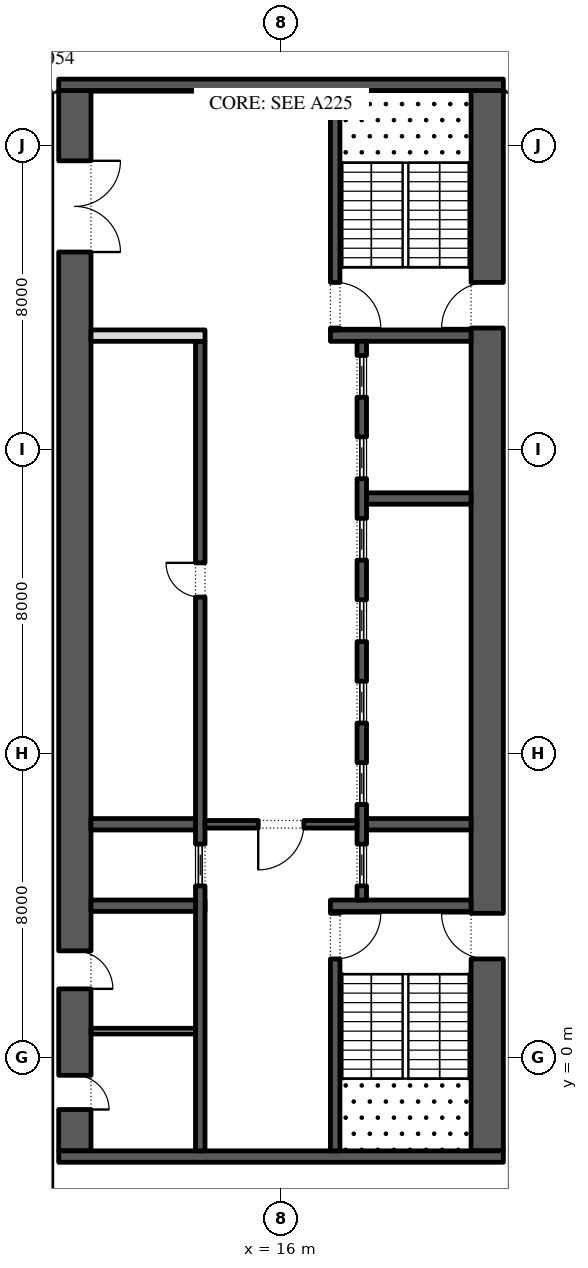
"""IFC4 building model, lengths in metres.
Left out: names, types, materials, properties, quantities, classifications, styles, units other than length and angle.
Written with IfcOpenShell. Run it as: python <this file> out.ifc"""

import sys

from ifc_helpers import new_model, si_unit, direction, frame, frame_2d, origin, place, context, subcontext, project, spatial, rectangle, extrude, element, fill, save


model = new_model("IFC4")
c1 = context("Model", 3, precision=1e-05, world=origin(), true_north=direction((0.0, 1.0)))
c2 = subcontext(c1, "Body", "Model", "MODEL_VIEW")
j1 = project(units=[si_unit("LENGTHUNIT", "METRE"), si_unit("PLANEANGLEUNIT", "RADIAN")], contexts=[c1])
p1 = place(None, origin())
s1 = spatial("IfcSite", under=j1, at=p1, CompositionType="ELEMENT")
p2 = place(p1, origin())
s2 = spatial("IfcBuilding", under=s1, at=p2, CompositionType="ELEMENT")
p3 = place(p2, frame((0.0, 0.0, 105.6)))
s3 = spatial("IfcBuildingStorey", under=s2, at=p3, CompositionType="ELEMENT", Elevation=105.6)
p4 = place(p3, frame((21.425, -2.45, 0.0), z_axis=(0.0, 0.0, 1.0), x_axis=(0.0, 1.0, 0.0)))
e1 = element("IfcWall", 1, at=p4, inside=s3, PredefinedType="SHEAR", context=c2, shape_type="SweptSolid", body=[
    extrude(rectangle(XDim=27.9, YDim=0.85, at=frame_2d((13.95, 0.0))), origin(), (0.0, 0.0, 1.0), 4.0),
])
p5 = place(p4, frame((5.05, 0.0, 0.0)))
e2 = element("IfcOpeningElement", 2, at=p5, cuts=e1, PredefinedType="OPENING", context=c2, shape_type="SweptSolid", body=[
    extrude(rectangle(XDim=1.2, YDim=2.1, at=frame_2d((0.6, 1.05))), frame((0.0, 0.435, 0.0), z_axis=(0.0, -1.0, 0.0), x_axis=(1.0, 0.0, 0.0)), (0.0, 0.0, 1.0), 0.87),
])
p6 = place(p4, frame((21.65, 0.0, 0.0)))
e3 = element("IfcOpeningElement", 3, at=p6, cuts=e1, PredefinedType="OPENING", context=c2, shape_type="SweptSolid", body=[
    extrude(rectangle(XDim=1.2, YDim=2.1, at=frame_2d((0.6, 1.05))), frame((0.0, 0.435, 0.0), z_axis=(0.0, -1.0, 0.0), x_axis=(1.0, 0.0, 0.0)), (0.0, 0.0, 1.0), 0.87),
])
p7 = place(p3, frame((10.575, -2.45, 0.0), z_axis=(0.0, 0.0, 1.0), x_axis=(0.0, 1.0, 0.0)))
e4 = element("IfcWall", 4, at=p7, inside=s3, PredefinedType="SHEAR", context=c2, shape_type="SweptSolid", body=[
    extrude(rectangle(XDim=27.9, YDim=0.85, at=frame_2d((13.95, 0.0))), origin(), (0.0, 0.0, 1.0), 4.0),
])
p8 = place(p7, frame((23.65, 0.0, 0.0)))
e5 = element("IfcOpeningElement", 5, at=p8, cuts=e4, PredefinedType="OPENING", context=c2, shape_type="SweptSolid", body=[
    extrude(rectangle(XDim=2.4, YDim=2.1, at=frame_2d((1.2, 1.05))), frame((0.0, 0.435, 0.0), z_axis=(0.0, -1.0, 0.0), x_axis=(1.0, 0.0, 0.0)), (0.0, 0.0, 1.0), 0.87),
])
p9 = place(p7, frame((1.087, 0.0, 0.0)))
e6 = element("IfcOpeningElement", 6, at=p9, cuts=e4, PredefinedType="OPENING", context=c2, shape_type="SweptSolid", body=[
    extrude(rectangle(XDim=0.9, YDim=2.1, at=frame_2d((0.45, 1.05))), frame((0.0, 0.435, 0.0), z_axis=(0.0, -1.0, 0.0), x_axis=(1.0, 0.0, 0.0)), (0.0, 0.0, 1.0), 0.87),
])
p10 = place(p7, frame((4.262, 0.0, 0.0)))
e7 = element("IfcOpeningElement", 7, at=p10, cuts=e4, PredefinedType="OPENING", context=c2, shape_type="SweptSolid", body=[
    extrude(rectangle(XDim=1.0, YDim=2.1, at=frame_2d((0.5, 1.05))), frame((0.0, 0.435, 0.0), z_axis=(0.0, -1.0, 0.0), x_axis=(1.0, 0.0, 0.0)), (0.0, 0.0, 1.0), 0.87),
])
for number, where, z_axis, x_axis in (
    (8, (10.15, -2.6, 0.0), (0.0, 0.0, 1.0), (1.0, 0.0, 0.0)),
    (9, (10.15, 25.6, 0.0), (0.0, 0.0, 1.0), (1.0, 0.0, 0.0)),
):
    element("IfcWall", number, at=place(p3, frame(where, z_axis=z_axis, x_axis=x_axis)), inside=s3, PredefinedType="SHEAR", context=c2, shape_type="SweptSolid", body=[
        extrude(rectangle(XDim=11.7, YDim=0.3, at=frame_2d((5.85, 0.0))), origin(), (0.0, 0.0, 1.0), 4.0),
    ])
p11 = place(p3, frame((17.3, 4.0, 0.0), z_axis=(0.0, 0.0, 1.0), x_axis=(1.0, 0.0, 0.0)))
e10 = element("IfcWall", 10, at=p11, inside=s3, PredefinedType="SHEAR", context=c2, shape_type="SweptSolid", body=[
    extrude(rectangle(XDim=3.7, YDim=0.3, at=frame_2d((1.85, 0.0))), origin(), (0.0, 0.0, 1.0), 4.0),
])
p12 = place(p3, frame((17.425, -2.45, 0.0), z_axis=(0.0, 0.0, 1.0), x_axis=(0.0, 1.0, 0.0)))
e11 = element("IfcWall", 11, at=p12, inside=s3, PredefinedType="SHEAR", context=c2, shape_type="SweptSolid", body=[
    extrude(rectangle(XDim=6.3, YDim=0.25, at=frame_2d((3.15, 0.0))), origin(), (0.0, 0.0, 1.0), 4.0),
])
p13 = place(p12, frame((5.05, 0.0, 0.0)))
e12 = element("IfcOpeningElement", 12, at=p13, cuts=e11, PredefinedType="OPENING", context=c2, shape_type="SweptSolid", body=[
    extrude(rectangle(XDim=1.2, YDim=2.1, at=frame_2d((0.6, 1.05))), frame((0.0, 0.135, 0.0), z_axis=(0.0, -1.0, 0.0), x_axis=(1.0, 0.0, 0.0)), (0.0, 0.0, 1.0), 0.27),
])
p14 = place(p3, frame((17.3, 19.0, 0.0), z_axis=(0.0, 0.0, 1.0), x_axis=(1.0, 0.0, 0.0)))
e13 = element("IfcWall", 13, at=p14, inside=s3, PredefinedType="SHEAR", context=c2, shape_type="SweptSolid", body=[
    extrude(rectangle(XDim=3.7, YDim=0.3, at=frame_2d((1.85, 0.0))), origin(), (0.0, 0.0, 1.0), 4.0),
])
p15 = place(p3, frame((17.425, 19.15, 0.0), z_axis=(0.0, 0.0, 1.0), x_axis=(0.0, 1.0, 0.0)))
e14 = element("IfcWall", 14, at=p15, inside=s3, PredefinedType="SHEAR", context=c2, shape_type="SweptSolid", body=[
    extrude(rectangle(XDim=6.3, YDim=0.25, at=frame_2d((3.15, 0.0))), origin(), (0.0, 0.0, 1.0), 4.0),
])
p16 = place(p15, frame((0.05, 0.0, 0.0)))
e15 = element("IfcOpeningElement", 15, at=p16, cuts=e14, PredefinedType="OPENING", context=c2, shape_type="SweptSolid", body=[
    extrude(rectangle(XDim=1.2, YDim=2.1, at=frame_2d((0.6, 1.05))), frame((0.0, 0.135, 0.0), z_axis=(0.0, -1.0, 0.0), x_axis=(1.0, 0.0, 0.0)), (0.0, 0.0, 1.0), 0.27),
])
for number, where, z_axis, x_axis in (
    (16, (18.25, 6.143, 0.0), (0.0, 0.0, 1.0), (1.0, 0.0, 0.0)),
    (17, (18.25, 14.714, 0.0), (0.0, 0.0, 1.0), (1.0, 0.0, 0.0)),
):
    element("IfcWall", number, at=place(p3, frame(where, z_axis=z_axis, x_axis=x_axis)), inside=s3, PredefinedType="SHEAR", context=c2, shape_type="SweptSolid", body=[
        extrude(rectangle(XDim=2.75, YDim=0.3, at=frame_2d((1.375, 0.0))), origin(), (0.0, 0.0, 1.0), 4.0),
    ])
p17 = place(p3, frame((18.125, 4.15, 0.0), z_axis=(0.0, 0.0, 1.0), x_axis=(0.0, 1.0, 0.0)))
e18 = element("IfcWall", 18, at=p17, inside=s3, PredefinedType="SHEAR", context=c2, shape_type="SweptSolid", body=[
    extrude(rectangle(XDim=14.7, YDim=0.25, at=frame_2d((7.35, 0.0))), origin(), (0.0, 0.0, 1.0), 4.0),
])
p18 = place(p17, frame((0.371, 0.0, 0.0)))
e19 = element("IfcOpeningElement", 19, at=p18, cuts=e18, PredefinedType="OPENING", context=c2, shape_type="SweptSolid", body=[
    extrude(rectangle(XDim=1.1, YDim=2.1, at=frame_2d((0.55, 1.05))), frame((0.0, 0.135, 0.0), z_axis=(0.0, -1.0, 0.0), x_axis=(1.0, 0.0, 0.0)), (0.0, 0.0, 1.0), 0.27),
])
p19 = place(p17, frame((2.514, 0.0, 0.0)))
e20 = element("IfcOpeningElement", 20, at=p19, cuts=e18, PredefinedType="OPENING", context=c2, shape_type="SweptSolid", body=[
    extrude(rectangle(XDim=1.1, YDim=2.1, at=frame_2d((0.55, 1.05))), frame((0.0, 0.135, 0.0), z_axis=(0.0, -1.0, 0.0), x_axis=(1.0, 0.0, 0.0)), (0.0, 0.0, 1.0), 0.27),
])
p20 = place(p17, frame((4.657, 0.0, 0.0)))
e21 = element("IfcOpeningElement", 21, at=p20, cuts=e18, PredefinedType="OPENING", context=c2, shape_type="SweptSolid", body=[
    extrude(rectangle(XDim=1.1, YDim=2.1, at=frame_2d((0.55, 1.05))), frame((0.0, 0.135, 0.0), z_axis=(0.0, -1.0, 0.0), x_axis=(1.0, 0.0, 0.0)), (0.0, 0.0, 1.0), 0.27),
])
p21 = place(p17, frame((6.8, 0.0, 0.0)))
e22 = element("IfcOpeningElement", 22, at=p21, cuts=e18, PredefinedType="OPENING", context=c2, shape_type="SweptSolid", body=[
    extrude(rectangle(XDim=1.1, YDim=2.1, at=frame_2d((0.55, 1.05))), frame((0.0, 0.135, 0.0), z_axis=(0.0, -1.0, 0.0), x_axis=(1.0, 0.0, 0.0)), (0.0, 0.0, 1.0), 0.27),
])
p22 = place(p17, frame((8.943, 0.0, 0.0)))
e23 = element("IfcOpeningElement", 23, at=p22, cuts=e18, PredefinedType="OPENING", context=c2, shape_type="SweptSolid", body=[
    extrude(rectangle(XDim=1.1, YDim=2.1, at=frame_2d((0.55, 1.05))), frame((0.0, 0.135, 0.0), z_axis=(0.0, -1.0, 0.0), x_axis=(1.0, 0.0, 0.0)), (0.0, 0.0, 1.0), 0.27),
])
p23 = place(p17, frame((11.086, 0.0, 0.0)))
e24 = element("IfcOpeningElement", 24, at=p23, cuts=e18, PredefinedType="OPENING", context=c2, shape_type="SweptSolid", body=[
    extrude(rectangle(XDim=1.1, YDim=2.1, at=frame_2d((0.55, 1.05))), frame((0.0, 0.135, 0.0), z_axis=(0.0, -1.0, 0.0), x_axis=(1.0, 0.0, 0.0)), (0.0, 0.0, 1.0), 0.27),
])
p24 = place(p17, frame((13.229, 0.0, 0.0)))
e25 = element("IfcOpeningElement", 25, at=p24, cuts=e18, PredefinedType="OPENING", context=c2, shape_type="SweptSolid", body=[
    extrude(rectangle(XDim=1.1, YDim=2.1, at=frame_2d((0.55, 1.05))), frame((0.0, 0.135, 0.0), z_axis=(0.0, -1.0, 0.0), x_axis=(1.0, 0.0, 0.0)), (0.0, 0.0, 1.0), 0.27),
])
p25 = place(p3, frame((11.0, 4.0, 0.0), z_axis=(0.0, 0.0, 1.0), x_axis=(1.0, 0.0, 0.0)))
e26 = element("IfcWall", 26, at=p25, inside=s3, PredefinedType="SHEAR", context=c2, shape_type="SweptSolid", body=[
    extrude(rectangle(XDim=3.0, YDim=0.3, at=frame_2d((1.5, 0.0))), origin(), (0.0, 0.0, 1.0), 4.0),
])
p26 = place(p3, frame((11.0, 6.143, 0.0), z_axis=(0.0, 0.0, 1.0), x_axis=(1.0, 0.0, 0.0)))
e27 = element("IfcWall", 27, at=p26, inside=s3, PredefinedType="SHEAR", context=c2, shape_type="SweptSolid", body=[
    extrude(rectangle(XDim=2.75, YDim=0.3, at=frame_2d((1.375, 0.0))), origin(), (0.0, 0.0, 1.0), 4.0),
])
p27 = place(p3, frame((13.875, -2.45, 0.0), z_axis=(0.0, 0.0, 1.0), x_axis=(0.0, 1.0, 0.0)))
e28 = element("IfcWall", 28, at=p27, inside=s3, PredefinedType="SHEAR", context=c2, shape_type="SweptSolid", body=[
    extrude(rectangle(XDim=21.3, YDim=0.25, at=frame_2d((10.65, 0.0))), origin(), (0.0, 0.0, 1.0), 4.0),
])
p28 = place(p27, frame((14.571, 0.0, 0.0)))
e29 = element("IfcOpeningElement", 29, at=p28, cuts=e28, PredefinedType="OPENING", context=c2, shape_type="SweptSolid", body=[
    extrude(rectangle(XDim=0.9, YDim=2.1, at=frame_2d((0.45, 1.05))), frame((0.0, 0.135, 0.0), z_axis=(0.0, -1.0, 0.0), x_axis=(1.0, 0.0, 0.0)), (0.0, 0.0, 1.0), 0.27),
])
p29 = place(p27, frame((6.971, 0.0, 0.0)))
e30 = element("IfcOpeningElement", 30, at=p29, cuts=e28, PredefinedType="OPENING", context=c2, shape_type="SweptSolid", body=[
    extrude(rectangle(XDim=1.1, YDim=2.1, at=frame_2d((0.55, 1.05))), frame((0.0, 0.135, 0.0), z_axis=(0.0, -1.0, 0.0), x_axis=(1.0, 0.0, 0.0)), (0.0, 0.0, 1.0), 0.27),
])
p30 = place(p3, frame((11.0, 19.0, 0.0), z_axis=(0.0, 0.0, 1.0), x_axis=(1.0, 0.0, 0.0)))
e31 = element("IfcWall", 31, at=p30, inside=s3, PredefinedType="PARTITIONING", context=c2, shape_type="SweptSolid", body=[
    extrude(rectangle(XDim=3.0, YDim=0.3, at=frame_2d((1.5, 0.0))), origin(), (0.0, 0.0, 1.0), 4.0),
])
p31 = place(p3, frame((14.0, 6.143, 0.0), z_axis=(0.0, 0.0, 1.0), x_axis=(1.0, 0.0, 0.0)))
e32 = element("IfcWall", 32, at=p31, inside=s3, PredefinedType="SHEAR", context=c2, shape_type="SweptSolid", body=[
    extrude(rectangle(XDim=4.0, YDim=0.2, at=frame_2d((2.0, 0.0))), origin(), (0.0, 0.0, 1.0), 4.0),
])
p32 = place(p31, frame((1.4, 0.0, 0.0)))
e33 = element("IfcOpeningElement", 33, at=p32, cuts=e32, PredefinedType="OPENING", context=c2, shape_type="SweptSolid", body=[
    extrude(rectangle(XDim=1.2, YDim=2.1, at=frame_2d((0.6, 1.05))), frame((0.0, 0.11, 0.0), z_axis=(0.0, -1.0, 0.0), x_axis=(1.0, 0.0, 0.0)), (0.0, 0.0, 1.0), 0.22),
])
p33 = place(p3, frame((11.0, 0.7, 0.0), z_axis=(0.0, 0.0, 1.0), x_axis=(1.0, 0.0, 0.0)))
e34 = element("IfcWall", 34, at=p33, inside=s3, PredefinedType="PARTITIONING", context=c2, shape_type="SweptSolid", body=[
    extrude(rectangle(XDim=2.75, YDim=0.15, at=frame_2d((1.375, 0.0))), origin(), (0.0, 0.0, 1.0), 4.0),
])
p34 = place(p18, origin())
e35 = element("IfcDoor", 35, at=p34, inside=s3, OperationType="SLIDING_TO_LEFT", PredefinedType="DOOR", context=c2, shape_type="SweptSolid", body=[
    extrude(rectangle(XDim=1.1, YDim=2.1, at=frame_2d((0.55, 1.05))), frame((0.0, 0.025, 0.0), z_axis=(0.0, -1.0, 0.0), x_axis=(1.0, 0.0, 0.0)), (0.0, 0.0, 1.0), 0.05),
])
fill(e19, e35)
p35 = place(p19, origin())
e36 = element("IfcDoor", 36, at=p35, inside=s3, OperationType="SLIDING_TO_LEFT", PredefinedType="DOOR", context=c2, shape_type="SweptSolid", body=[
    extrude(rectangle(XDim=1.1, YDim=2.1, at=frame_2d((0.55, 1.05))), frame((0.0, 0.025, 0.0), z_axis=(0.0, -1.0, 0.0), x_axis=(1.0, 0.0, 0.0)), (0.0, 0.0, 1.0), 0.05),
])
fill(e20, e36)
p36 = place(p20, origin())
e37 = element("IfcDoor", 37, at=p36, inside=s3, OperationType="SLIDING_TO_LEFT", PredefinedType="DOOR", context=c2, shape_type="SweptSolid", body=[
    extrude(rectangle(XDim=1.1, YDim=2.1, at=frame_2d((0.55, 1.05))), frame((0.0, 0.025, 0.0), z_axis=(0.0, -1.0, 0.0), x_axis=(1.0, 0.0, 0.0)), (0.0, 0.0, 1.0), 0.05),
])
fill(e21, e37)
p37 = place(p21, origin())
e38 = element("IfcDoor", 38, at=p37, inside=s3, OperationType="SLIDING_TO_LEFT", PredefinedType="DOOR", context=c2, shape_type="SweptSolid", body=[
    extrude(rectangle(XDim=1.1, YDim=2.1, at=frame_2d((0.55, 1.05))), frame((0.0, 0.025, 0.0), z_axis=(0.0, -1.0, 0.0), x_axis=(1.0, 0.0, 0.0)), (0.0, 0.0, 1.0), 0.05),
])
fill(e22, e38)
p38 = place(p22, origin())
e39 = element("IfcDoor", 39, at=p38, inside=s3, OperationType="SLIDING_TO_LEFT", PredefinedType="DOOR", context=c2, shape_type="SweptSolid", body=[
    extrude(rectangle(XDim=1.1, YDim=2.1, at=frame_2d((0.55, 1.05))), frame((0.0, 0.025, 0.0), z_axis=(0.0, -1.0, 0.0), x_axis=(1.0, 0.0, 0.0)), (0.0, 0.0, 1.0), 0.05),
])
fill(e23, e39)
p39 = place(p23, origin())
e40 = element("IfcDoor", 40, at=p39, inside=s3, OperationType="SLIDING_TO_LEFT", PredefinedType="DOOR", context=c2, shape_type="SweptSolid", body=[
    extrude(rectangle(XDim=1.1, YDim=2.1, at=frame_2d((0.55, 1.05))), frame((0.0, 0.025, 0.0), z_axis=(0.0, -1.0, 0.0), x_axis=(1.0, 0.0, 0.0)), (0.0, 0.0, 1.0), 0.05),
])
fill(e24, e40)
p40 = place(p24, origin())
e41 = element("IfcDoor", 41, at=p40, inside=s3, OperationType="SLIDING_TO_LEFT", PredefinedType="DOOR", context=c2, shape_type="SweptSolid", body=[
    extrude(rectangle(XDim=1.1, YDim=2.1, at=frame_2d((0.55, 1.05))), frame((0.0, 0.025, 0.0), z_axis=(0.0, -1.0, 0.0), x_axis=(1.0, 0.0, 0.0)), (0.0, 0.0, 1.0), 0.05),
])
fill(e25, e41)
p41 = place(p28, origin())
e42 = element("IfcDoor", 42, at=p41, inside=s3, OperationType="SINGLE_SWING_LEFT", PredefinedType="DOOR", context=c2, shape_type="SweptSolid", body=[
    extrude(rectangle(XDim=0.9, YDim=2.1, at=frame_2d((0.45, 1.05))), frame((0.0, 0.125, 0.0), z_axis=(0.0, -1.0, 0.0), x_axis=(1.0, 0.0, 0.0)), (0.0, 0.0, 1.0), 0.05),
])
fill(e29, e42)
p42 = place(p29, origin())
e43 = element("IfcDoor", 43, at=p42, inside=s3, OperationType="SLIDING_TO_LEFT", PredefinedType="DOOR", context=c2, shape_type="SweptSolid", body=[
    extrude(rectangle(XDim=1.1, YDim=2.1, at=frame_2d((0.55, 1.05))), frame((0.0, 0.025, 0.0), z_axis=(0.0, -1.0, 0.0), x_axis=(1.0, 0.0, 0.0)), (0.0, 0.0, 1.0), 0.05),
])
fill(e30, e43)
p43 = place(p32, frame((1.2, 0.0, 0.0), z_axis=(0.0, 0.0, 1.0), x_axis=(-1.0, 0.0, 0.0)))
e44 = element("IfcDoor", 44, at=p43, inside=s3, OperationType="SINGLE_SWING_LEFT", PredefinedType="DOOR", context=c2, shape_type="SweptSolid", body=[
    extrude(rectangle(XDim=1.2, YDim=2.1, at=frame_2d((0.6, 1.05))), frame((0.0, 0.025, 0.0), z_axis=(0.0, -1.0, 0.0), x_axis=(1.0, 0.0, 0.0)), (0.0, 0.0, 1.0), 0.05),
])
fill(e33, e44)
p44 = place(p8, frame((2.4, 0.0, 0.0), z_axis=(0.0, 0.0, 1.0), x_axis=(-1.0, 0.0, 0.0)))
e45 = element("IfcDoor", 45, at=p44, inside=s3, OperationType="DOUBLE_DOOR_SINGLE_SWING", PredefinedType="DOOR", context=c2, shape_type="SweptSolid", body=[
    extrude(rectangle(XDim=2.4, YDim=2.1, at=frame_2d((1.2, 1.05))), frame((0.0, 0.025, 0.0), z_axis=(0.0, -1.0, 0.0), x_axis=(1.0, 0.0, 0.0)), (0.0, 0.0, 1.0), 0.05),
])
fill(e5, e45)
p45 = place(p13, frame((1.2, 0.0, 0.0), z_axis=(0.0, 0.0, 1.0), x_axis=(-1.0, 0.0, 0.0)))
e46 = element("IfcDoor", 46, at=p45, inside=s3, OperationType="SINGLE_SWING_RIGHT", PredefinedType="DOOR", context=c2, shape_type="SweptSolid", body=[
    extrude(rectangle(XDim=1.2, YDim=2.1, at=frame_2d((0.6, 1.05))), frame((0.0, 0.025, 0.0), z_axis=(0.0, -1.0, 0.0), x_axis=(1.0, 0.0, 0.0)), (0.0, 0.0, 1.0), 0.05),
])
fill(e12, e46)
p46 = place(p5, origin())
e47 = element("IfcDoor", 47, at=p46, inside=s3, OperationType="SINGLE_SWING_LEFT", PredefinedType="DOOR", context=c2, shape_type="SweptSolid", body=[
    extrude(rectangle(XDim=1.2, YDim=2.1, at=frame_2d((0.6, 1.05))), frame((0.0, 0.025, 0.0), z_axis=(0.0, -1.0, 0.0), x_axis=(1.0, 0.0, 0.0)), (0.0, 0.0, 1.0), 0.05),
])
fill(e2, e47)
p47 = place(p16, frame((1.2, 0.0, 0.0), z_axis=(0.0, 0.0, 1.0), x_axis=(-1.0, 0.0, 0.0)))
e48 = element("IfcDoor", 48, at=p47, inside=s3, OperationType="SINGLE_SWING_LEFT", PredefinedType="DOOR", context=c2, shape_type="SweptSolid", body=[
    extrude(rectangle(XDim=1.2, YDim=2.1, at=frame_2d((0.6, 1.05))), frame((0.0, 0.025, 0.0), z_axis=(0.0, -1.0, 0.0), x_axis=(1.0, 0.0, 0.0)), (0.0, 0.0, 1.0), 0.05),
])
fill(e15, e48)
p48 = place(p6, origin())
e49 = element("IfcDoor", 49, at=p48, inside=s3, OperationType="SINGLE_SWING_RIGHT", PredefinedType="DOOR", context=c2, shape_type="SweptSolid", body=[
    extrude(rectangle(XDim=1.2, YDim=2.1, at=frame_2d((0.6, 1.05))), frame((0.0, 0.025, 0.0), z_axis=(0.0, -1.0, 0.0), x_axis=(1.0, 0.0, 0.0)), (0.0, 0.0, 1.0), 0.05),
])
fill(e3, e49)
p49 = place(p9, frame((0.9, -0.8, 0.0), z_axis=(0.0, 0.0, 1.0), x_axis=(-1.0, 0.0, 0.0)))
e50 = element("IfcDoor", 50, at=p49, inside=s3, OperationType="SINGLE_SWING_LEFT", PredefinedType="DOOR", context=c2, shape_type="SweptSolid", body=[
    extrude(rectangle(XDim=0.9, YDim=2.1, at=frame_2d((0.45, 1.05))), frame((0.0, -0.375, 0.0), z_axis=(0.0, -1.0, 0.0), x_axis=(1.0, 0.0, 0.0)), (0.0, 0.0, 1.0), 0.05),
])
fill(e6, e50)
p50 = place(p10, frame((1.0, -0.8, 0.0), z_axis=(0.0, 0.0, 1.0), x_axis=(-1.0, 0.0, 0.0)))
e51 = element("IfcDoor", 51, at=p50, inside=s3, OperationType="SINGLE_SWING_LEFT", PredefinedType="DOOR", context=c2, shape_type="SweptSolid", body=[
    extrude(rectangle(XDim=1.0, YDim=2.1, at=frame_2d((0.5, 1.05))), frame((0.0, -0.375, 0.0), z_axis=(0.0, -1.0, 0.0), x_axis=(1.0, 0.0, 0.0)), (0.0, 0.0, 1.0), 0.05),
])
fill(e7, e51)
save(model, sys.argv[1])
